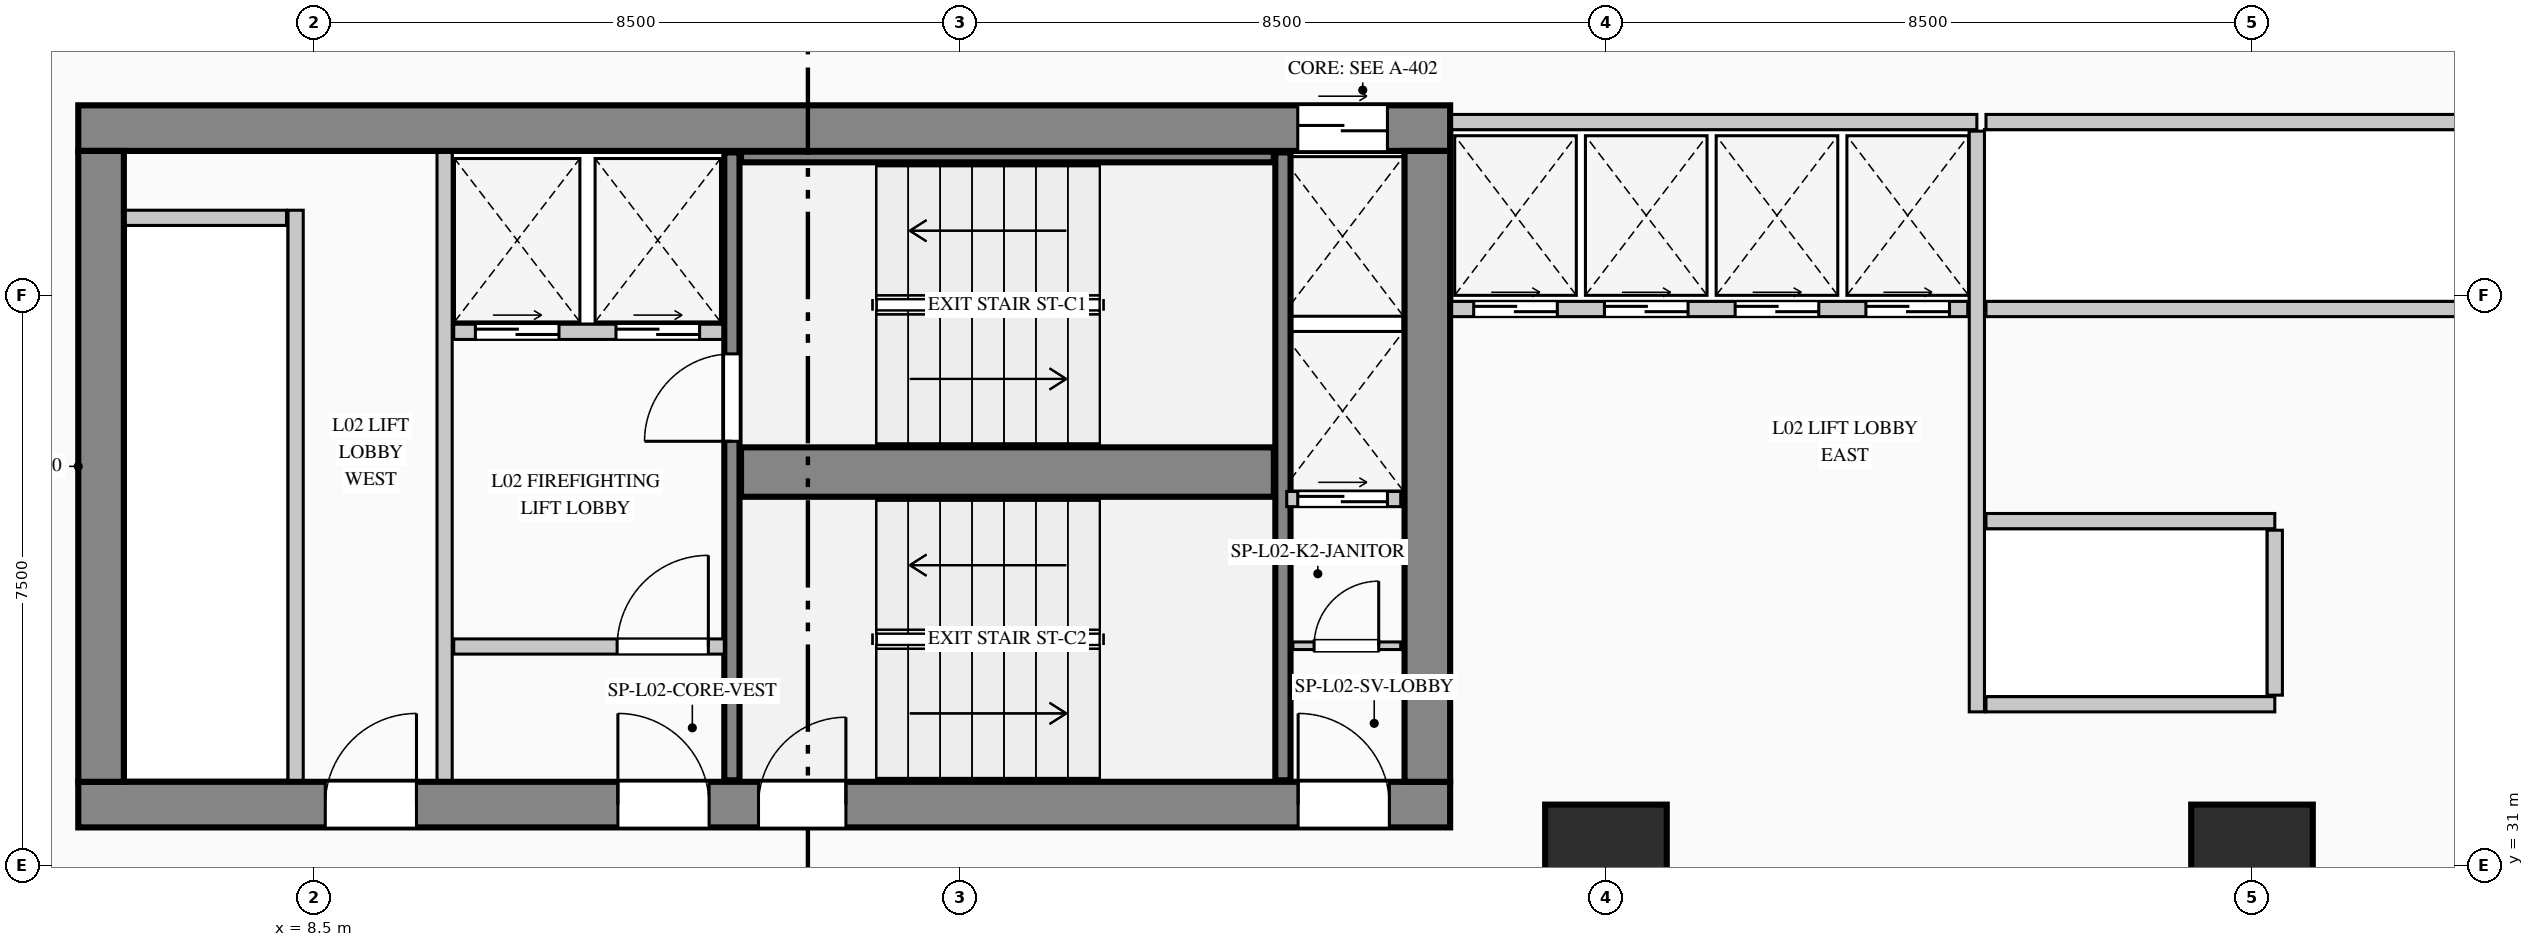
"""IFC4 building model, lengths in metres.
Left out: names, types, materials, properties, quantities, classifications, styles, units other than length and angle.
Written with IfcOpenShell. Run it as: python <this file> out.ifc"""

import sys

from ifc_helpers import new_model, si_unit, direction, frame, frame_2d, origin, origin_2d, place, context, subcontext, project, spatial, rectangle, extrude, element, fill, save


model = new_model("IFC4")
c1 = context("Model", 3, precision=1e-05, world=origin(), true_north=direction((0.0, 1.0)))
c2 = subcontext(c1, "Body", "Model", "MODEL_VIEW")
j1 = project(units=[si_unit("LENGTHUNIT", "METRE"), si_unit("PLANEANGLEUNIT", "RADIAN")], contexts=[c1])
p1 = place(None, origin())
s1 = spatial("IfcSite", under=j1, at=p1, CompositionType="ELEMENT")
p2 = place(p1, origin())
s2 = spatial("IfcBuilding", under=s1, at=p2, CompositionType="ELEMENT")
p3 = place(p2, frame((0.0, 0.0, 5.4)))
s3 = spatial("IfcBuildingStorey", under=s2, at=p3, CompositionType="ELEMENT", Elevation=5.4)
p4 = place(p3, frame((5.4, 40.7, 0.0), z_axis=(0.0, 0.0, 1.0), x_axis=(1.0, 0.0, 0.0)))
e1 = element("IfcWall", 1, at=p4, inside=s3, PredefinedType="SHEAR", context=c2, shape_type="SweptSolid", body=[
    extrude(rectangle(XDim=18.05, YDim=0.6, at=frame_2d((9.025, 0.0))), origin(), (0.0, 0.0, 1.0), 5.4),
])
p5 = place(p4, frame((16.045, 0.0, 0.0)))
e2 = element("IfcOpeningElement", 2, at=p5, cuts=e1, PredefinedType="OPENING", context=c2, shape_type="SweptSolid", body=[
    extrude(rectangle(XDim=1.18, YDim=2.25, at=frame_2d((0.59, 1.125))), frame((0.0, 0.31, 0.0), z_axis=(0.0, -1.0, 0.0), x_axis=(1.0, 0.0, 0.0)), (0.0, 0.0, 1.0), 0.62),
])
p6 = place(p3, frame((5.4, 31.8, 0.0), z_axis=(0.0, 0.0, 1.0), x_axis=(1.0, 0.0, 0.0)))
e3 = element("IfcWall", 3, at=p6, inside=s3, PredefinedType="SHEAR", context=c2, shape_type="SweptSolid", body=[
    extrude(rectangle(XDim=18.05, YDim=0.6, at=frame_2d((9.025, 0.0))), origin(), (0.0, 0.0, 1.0), 5.4),
])
p7 = place(p6, frame((3.25, 0.0, 0.0)))
e4 = element("IfcOpeningElement", 4, at=p7, cuts=e3, PredefinedType="OPENING", context=c2, shape_type="SweptSolid", body=[
    extrude(rectangle(XDim=1.2, YDim=2.2, at=frame_2d((0.6, 1.1))), frame((0.0, 0.31, 0.0), z_axis=(0.0, -1.0, 0.0), x_axis=(1.0, 0.0, 0.0)), (0.0, 0.0, 1.0), 0.62),
])
p8 = place(p6, frame((7.1, 0.0, 0.0)))
e5 = element("IfcOpeningElement", 5, at=p8, cuts=e3, PredefinedType="OPENING", context=c2, shape_type="SweptSolid", body=[
    extrude(rectangle(XDim=1.2, YDim=2.2, at=frame_2d((0.6, 1.1))), frame((0.0, 0.31, 0.0), z_axis=(0.0, -1.0, 0.0), x_axis=(1.0, 0.0, 0.0)), (0.0, 0.0, 1.0), 0.62),
])
p9 = place(p6, frame((8.95, 0.0, 0.0)))
e6 = element("IfcOpeningElement", 6, at=p9, cuts=e3, PredefinedType="OPENING", context=c2, shape_type="SweptSolid", body=[
    extrude(rectangle(XDim=1.15, YDim=2.2, at=frame_2d((0.575, 1.1))), frame((0.0, 0.31, 0.0), z_axis=(0.0, -1.0, 0.0), x_axis=(1.0, 0.0, 0.0)), (0.0, 0.0, 1.0), 0.62),
])
p10 = place(p6, frame((16.05, 0.0, 0.0)))
e7 = element("IfcOpeningElement", 7, at=p10, cuts=e3, PredefinedType="OPENING", context=c2, shape_type="SweptSolid", body=[
    extrude(rectangle(XDim=1.2, YDim=2.2, at=frame_2d((0.6, 1.1))), frame((0.0, 0.31, 0.0), z_axis=(0.0, -1.0, 0.0), x_axis=(1.0, 0.0, 0.0)), (0.0, 0.0, 1.0), 0.62),
])
for number, where, z_axis, x_axis in (
    (8, (5.7, 32.1, 0.0), (0.0, 0.0, 1.0), (0.0, 1.0, 0.0)),
    (9, (23.15, 32.1, 0.0), (0.0, 0.0, 1.0), (0.0, 1.0, 0.0)),
):
    element("IfcWall", number, at=place(p3, frame(where, z_axis=z_axis, x_axis=x_axis)), inside=s3, PredefinedType="SHEAR", context=c2, shape_type="SweptSolid", body=[
        extrude(rectangle(XDim=8.3, YDim=0.6, at=frame_2d((4.15, 0.0))), origin(), (0.0, 0.0, 1.0), 5.4),
    ])
p11 = place(p3, frame((14.0, 32.12, 0.0), z_axis=(0.0, 0.0, 1.0), x_axis=(0.0, 1.0, 0.0)))
e10 = element("IfcWall", 10, at=p11, inside=s3, PredefinedType="SHEAR", context=c2, shape_type="SweptSolid", body=[
    extrude(rectangle(XDim=8.26, YDim=0.2, at=frame_2d((4.13, 0.0))), origin(), (0.0, 0.0, 1.0), 5.4),
])
p12 = place(p11, frame((4.46, 0.0, 0.0)))
e11 = element("IfcOpeningElement", 11, at=p12, cuts=e10, PredefinedType="OPENING", context=c2, shape_type="SweptSolid", body=[
    extrude(rectangle(XDim=1.15, YDim=2.2, at=frame_2d((0.575, 1.1))), frame((0.0, 0.11, 0.0), z_axis=(0.0, -1.0, 0.0), x_axis=(1.0, 0.0, 0.0)), (0.0, 0.0, 1.0), 0.22),
])
p13 = place(p3, frame((14.12, 36.175, 0.0), z_axis=(0.0, 0.0, 1.0), x_axis=(1.0, 0.0, 0.0)))
e12 = element("IfcWall", 12, at=p13, inside=s3, PredefinedType="SHEAR", context=c2, shape_type="SweptSolid", body=[
    extrude(rectangle(XDim=7.01, YDim=0.65, at=frame_2d((3.505, 0.0))), origin(), (0.0, 0.0, 1.0), 5.4),
])
p14 = place(p3, frame((21.25, 32.12, 0.0), z_axis=(0.0, 0.0, 1.0), x_axis=(0.0, 1.0, 0.0)))
e13 = element("IfcWall", 13, at=p14, inside=s3, PredefinedType="SHEAR", context=c2, shape_type="SweptSolid", body=[
    extrude(rectangle(XDim=8.26, YDim=0.2, at=frame_2d((4.13, 0.0))), origin(), (0.0, 0.0, 1.0), 5.4),
])
p15 = place(p3, frame((14.12, 40.32, 0.0), z_axis=(0.0, 0.0, 1.0), x_axis=(1.0, 0.0, 0.0)))
e14 = element("IfcWall", 14, at=p15, inside=s3, PredefinedType="SHEAR", context=c2, shape_type="SweptSolid", body=[
    extrude(rectangle(XDim=7.01, YDim=0.14, at=frame_2d((3.505, 0.0))), origin(), (0.0, 0.0, 1.0), 5.4),
])
for number, where, z_axis, x_axis in (
    (15, (25.5, 31.0, 0.0), (0.0, 0.0, 1.0), (1.0, 0.0, 0.0)),
    (16, (34.0, 31.0, 0.0), (0.0, 0.0, 1.0), (1.0, 0.0, 0.0)),
):
    element("IfcColumn", number, at=place(p3, frame(where, z_axis=z_axis, x_axis=x_axis)), inside=s3, PredefinedType="COLUMN", context=c2, shape_type="SweptSolid", body=[
        extrude(rectangle(XDim=1.6, YDim=1.6, at=origin_2d()), origin(), (0.0, 0.0, 1.0), 5.4),
    ])
p16 = place(p3, frame((8.26, 32.12, 0.0), z_axis=(0.0, 0.0, 1.0), x_axis=(0.0, 1.0, 0.0)))
e17 = element("IfcWall", 17, at=p16, inside=s3, PredefinedType="PARTITIONING", context=c2, shape_type="SweptSolid", body=[
    extrude(rectangle(XDim=7.5, YDim=0.2, at=frame_2d((3.75, 0.0))), origin(), (0.0, 0.0, 1.0), 5.08),
])
p17 = place(p3, frame((6.02, 39.52, 0.0), z_axis=(0.0, 0.0, 1.0), x_axis=(1.0, 0.0, 0.0)))
e18 = element("IfcWall", 18, at=p17, inside=s3, PredefinedType="PARTITIONING", context=c2, shape_type="SweptSolid", body=[
    extrude(rectangle(XDim=2.12, YDim=0.2, at=frame_2d((1.06, 0.0))), origin(), (0.0, 0.0, 1.0), 5.08),
])
p18 = place(p3, frame((10.22, 32.12, 0.0), z_axis=(0.0, 0.0, 1.0), x_axis=(0.0, 1.0, 0.0)))
e19 = element("IfcWall", 19, at=p18, inside=s3, PredefinedType="PARTITIONING", context=c2, shape_type="SweptSolid", body=[
    extrude(rectangle(XDim=8.26, YDim=0.2, at=frame_2d((4.13, 0.0))), origin(), (0.0, 0.0, 1.0), 5.08),
])
p19 = place(p3, frame((10.34, 38.02, 0.0), z_axis=(0.0, 0.0, 1.0), x_axis=(1.0, 0.0, 0.0)))
e20 = element("IfcWall", 20, at=p19, inside=s3, PredefinedType="PARTITIONING", context=c2, shape_type="SweptSolid", body=[
    extrude(rectangle(XDim=3.54, YDim=0.2, at=frame_2d((1.77, 0.0))), origin(), (0.0, 0.0, 1.0), 5.08),
])
p20 = place(p19, frame((0.285, 0.0, 0.0)))
e21 = element("IfcOpeningElement", 21, at=p20, cuts=e20, PredefinedType="OPENING", context=c2, shape_type="SweptSolid", body=[
    extrude(rectangle(XDim=1.1, YDim=2.2, at=frame_2d((0.55, 1.1))), frame((0.0, 0.11, 0.0), z_axis=(0.0, -1.0, 0.0), x_axis=(1.0, 0.0, 0.0)), (0.0, 0.0, 1.0), 0.22),
])
p21 = place(p19, frame((2.135, 0.0, 0.0)))
e22 = element("IfcOpeningElement", 22, at=p21, cuts=e20, PredefinedType="OPENING", context=c2, shape_type="SweptSolid", body=[
    extrude(rectangle(XDim=1.1, YDim=2.2, at=frame_2d((0.55, 1.1))), frame((0.0, 0.11, 0.0), z_axis=(0.0, -1.0, 0.0), x_axis=(1.0, 0.0, 0.0)), (0.0, 0.0, 1.0), 0.22),
])
p22 = place(p3, frame((10.34, 33.88, 0.0), z_axis=(0.0, 0.0, 1.0), x_axis=(1.0, 0.0, 0.0)))
e23 = element("IfcWall", 23, at=p22, inside=s3, PredefinedType="PARTITIONING", context=c2, shape_type="SweptSolid", body=[
    extrude(rectangle(XDim=3.56, YDim=0.2, at=frame_2d((1.78, 0.0))), origin(), (0.0, 0.0, 1.0), 5.08),
])
p23 = place(p22, frame((2.15, 0.0, 0.0)))
e24 = element("IfcOpeningElement", 24, at=p23, cuts=e23, PredefinedType="OPENING", context=c2, shape_type="SweptSolid", body=[
    extrude(rectangle(XDim=1.2, YDim=2.2, at=frame_2d((0.6, 1.1))), frame((0.0, 0.11, 0.0), z_axis=(0.0, -1.0, 0.0), x_axis=(1.0, 0.0, 0.0)), (0.0, 0.0, 1.0), 0.22),
])
p24 = place(p3, frame((21.38, 33.89, 0.0), z_axis=(0.0, 0.0, 1.0), x_axis=(1.0, 0.0, 0.0)))
e25 = element("IfcWall", 25, at=p24, inside=s3, PredefinedType="PARTITIONING", context=c2, shape_type="SweptSolid", body=[
    extrude(rectangle(XDim=1.42, YDim=0.1, at=frame_2d((0.71, 0.0))), origin(), (0.0, 0.0, 1.0), 5.08),
])
p25 = place(p24, frame((0.28, 0.0, 0.0)))
e26 = element("IfcOpeningElement", 26, at=p25, cuts=e25, PredefinedType="OPENING", context=c2, shape_type="SweptSolid", body=[
    extrude(rectangle(XDim=0.85, YDim=2.1, at=frame_2d((0.425, 1.05))), frame((0.0, 0.06, 0.0), z_axis=(0.0, -1.0, 0.0), x_axis=(1.0, 0.0, 0.0)), (0.0, 0.0, 1.0), 0.12),
])
p26 = place(p3, frame((21.3, 35.82, 0.0), z_axis=(0.0, 0.0, 1.0), x_axis=(1.0, 0.0, 0.0)))
e27 = element("IfcWall", 27, at=p26, inside=s3, PredefinedType="PARTITIONING", context=c2, shape_type="SweptSolid", body=[
    extrude(rectangle(XDim=1.5, YDim=0.2, at=frame_2d((0.75, 0.0))), origin(), (0.0, 0.0, 1.0), 5.08),
])
p27 = place(p26, frame((0.145, 0.0, 0.0)))
e28 = element("IfcOpeningElement", 28, at=p27, cuts=e27, PredefinedType="OPENING", context=c2, shape_type="SweptSolid", body=[
    extrude(rectangle(XDim=1.18, YDim=2.25, at=frame_2d((0.59, 1.125))), frame((0.0, 0.11, 0.0), z_axis=(0.0, -1.0, 0.0), x_axis=(1.0, 0.0, 0.0)), (0.0, 0.0, 1.0), 0.22),
])
p28 = place(p3, frame((23.47, 40.78, 0.0), z_axis=(0.0, 0.0, 1.0), x_axis=(1.0, 0.0, 0.0)))
e29 = element("IfcWall", 29, at=p28, inside=s3, PredefinedType="PARTITIONING", context=c2, shape_type="SweptSolid", body=[
    extrude(rectangle(XDim=6.91, YDim=0.2, at=frame_2d((3.455, 0.0))), origin(), (0.0, 0.0, 1.0), 5.08),
])
p29 = place(p3, frame((30.38, 33.02, 0.0), z_axis=(0.0, 0.0, 1.0), x_axis=(0.0, 1.0, 0.0)))
e30 = element("IfcWall", 30, at=p29, inside=s3, PredefinedType="PARTITIONING", context=c2, shape_type="SweptSolid", body=[
    extrude(rectangle(XDim=7.64, YDim=0.2, at=frame_2d((3.82, 0.0))), origin(), (0.0, 0.0, 1.0), 5.08),
])
p30 = place(p3, frame((23.47, 38.32, 0.0), z_axis=(0.0, 0.0, 1.0), x_axis=(1.0, 0.0, 0.0)))
e31 = element("IfcWall", 31, at=p30, inside=s3, PredefinedType="PARTITIONING", context=c2, shape_type="SweptSolid", body=[
    extrude(rectangle(XDim=6.79, YDim=0.2, at=frame_2d((3.395, 0.0))), origin(), (0.0, 0.0, 1.0), 5.08),
])
p31 = place(p30, frame((0.29, 0.0, 0.0)))
e32 = element("IfcOpeningElement", 32, at=p31, cuts=e31, PredefinedType="OPENING", context=c2, shape_type="SweptSolid", body=[
    extrude(rectangle(XDim=1.1, YDim=2.2, at=frame_2d((0.55, 1.1))), frame((0.0, 0.11, 0.0), z_axis=(0.0, -1.0, 0.0), x_axis=(1.0, 0.0, 0.0)), (0.0, 0.0, 1.0), 0.22),
])
p32 = place(p30, frame((2.01, 0.0, 0.0)))
e33 = element("IfcOpeningElement", 33, at=p32, cuts=e31, PredefinedType="OPENING", context=c2, shape_type="SweptSolid", body=[
    extrude(rectangle(XDim=1.1, YDim=2.2, at=frame_2d((0.55, 1.1))), frame((0.0, 0.11, 0.0), z_axis=(0.0, -1.0, 0.0), x_axis=(1.0, 0.0, 0.0)), (0.0, 0.0, 1.0), 0.22),
])
p33 = place(p30, frame((3.73, 0.0, 0.0)))
e34 = element("IfcOpeningElement", 34, at=p33, cuts=e31, PredefinedType="OPENING", context=c2, shape_type="SweptSolid", body=[
    extrude(rectangle(XDim=1.1, YDim=2.2, at=frame_2d((0.55, 1.1))), frame((0.0, 0.11, 0.0), z_axis=(0.0, -1.0, 0.0), x_axis=(1.0, 0.0, 0.0)), (0.0, 0.0, 1.0), 0.22),
])
p34 = place(p30, frame((5.45, 0.0, 0.0)))
e35 = element("IfcOpeningElement", 35, at=p34, cuts=e31, PredefinedType="OPENING", context=c2, shape_type="SweptSolid", body=[
    extrude(rectangle(XDim=1.1, YDim=2.2, at=frame_2d((0.55, 1.1))), frame((0.0, 0.11, 0.0), z_axis=(0.0, -1.0, 0.0), x_axis=(1.0, 0.0, 0.0)), (0.0, 0.0, 1.0), 0.22),
])
p35 = place(p3, frame((30.5, 40.78, 0.0), z_axis=(0.0, 0.0, 1.0), x_axis=(1.0, 0.0, 0.0)))
e36 = element("IfcWall", 36, at=p35, inside=s3, PredefinedType="PARTITIONING", context=c2, shape_type="SweptSolid", body=[
    extrude(rectangle(XDim=6.98, YDim=0.2, at=frame_2d((3.49, 0.0))), origin(), (0.0, 0.0, 1.0), 5.08),
])
p36 = place(p3, frame((30.5, 38.32, 0.0), z_axis=(0.0, 0.0, 1.0), x_axis=(1.0, 0.0, 0.0)))
e37 = element("IfcWall", 37, at=p36, inside=s3, PredefinedType="PARTITIONING", context=c2, shape_type="SweptSolid", body=[
    extrude(rectangle(XDim=6.86, YDim=0.2, at=frame_2d((3.43, 0.0))), origin(), (0.0, 0.0, 1.0), 5.08),
])
for number, where, z_axis, x_axis in (
    (38, (30.5, 35.53, 0.0), (0.0, 0.0, 1.0), (1.0, 0.0, 0.0)),
    (39, (30.5, 33.12, 0.0), (0.0, 0.0, 1.0), (1.0, 0.0, 0.0)),
):
    element("IfcWall", number, at=place(p3, frame(where, z_axis=z_axis, x_axis=x_axis)), inside=s3, PredefinedType="PARTITIONING", context=c2, shape_type="SweptSolid", body=[
        extrude(rectangle(XDim=3.8, YDim=0.2, at=frame_2d((1.9, 0.0))), origin(), (0.0, 0.0, 1.0), 5.08),
    ])
p37 = place(p3, frame((34.3, 33.24, 0.0), z_axis=(0.0, 0.0, 1.0), x_axis=(0.0, 1.0, 0.0)))
e40 = element("IfcWall", 40, at=p37, inside=s3, PredefinedType="PARTITIONING", context=c2, shape_type="SweptSolid", body=[
    extrude(rectangle(XDim=2.17, YDim=0.2, at=frame_2d((1.085, 0.0))), origin(), (0.0, 0.0, 1.0), 5.08),
])
p38 = place(p7, origin())
e41 = element("IfcDoor", 41, at=p38, inside=s3, OperationType="SINGLE_SWING_RIGHT", PredefinedType="DOOR", context=c2, shape_type="SweptSolid", body=[
    extrude(rectangle(XDim=1.2, YDim=2.2, at=frame_2d((0.6, 1.1))), frame((0.0, 0.025, 0.0), z_axis=(0.0, -1.0, 0.0), x_axis=(1.0, 0.0, 0.0)), (0.0, 0.0, 1.0), 0.05),
])
fill(e4, e41)
p39 = place(p8, origin())
e42 = element("IfcDoor", 42, at=p39, inside=s3, OperationType="SINGLE_SWING_LEFT", PredefinedType="DOOR", context=c2, shape_type="SweptSolid", body=[
    extrude(rectangle(XDim=1.2, YDim=2.2, at=frame_2d((0.6, 1.1))), frame((0.0, 0.025, 0.0), z_axis=(0.0, -1.0, 0.0), x_axis=(1.0, 0.0, 0.0)), (0.0, 0.0, 1.0), 0.05),
])
fill(e5, e42)
p40 = place(p9, origin())
e43 = element("IfcDoor", 43, at=p40, inside=s3, OperationType="SINGLE_SWING_RIGHT", PredefinedType="DOOR", context=c2, shape_type="SweptSolid", body=[
    extrude(rectangle(XDim=1.15, YDim=2.2, at=frame_2d((0.575, 1.1))), frame((0.0, 0.025, 0.0), z_axis=(0.0, -1.0, 0.0), x_axis=(1.0, 0.0, 0.0)), (0.0, 0.0, 1.0), 0.05),
])
fill(e6, e43)
p41 = place(p10, origin())
e44 = element("IfcDoor", 44, at=p41, inside=s3, OperationType="SINGLE_SWING_LEFT", PredefinedType="DOOR", context=c2, shape_type="SweptSolid", body=[
    extrude(rectangle(XDim=1.2, YDim=2.2, at=frame_2d((0.6, 1.1))), frame((0.0, 0.025, 0.0), z_axis=(0.0, -1.0, 0.0), x_axis=(1.0, 0.0, 0.0)), (0.0, 0.0, 1.0), 0.05),
])
fill(e7, e44)
p42 = place(p23, origin())
e45 = element("IfcDoor", 45, at=p42, inside=s3, OperationType="SINGLE_SWING_RIGHT", PredefinedType="DOOR", context=c2, shape_type="SweptSolid", body=[
    extrude(rectangle(XDim=1.2, YDim=2.2, at=frame_2d((0.6, 1.1))), frame((0.0, 0.025, 0.0), z_axis=(0.0, -1.0, 0.0), x_axis=(1.0, 0.0, 0.0)), (0.0, 0.0, 1.0), 0.05),
])
fill(e24, e45)
p43 = place(p25, origin())
e46 = element("IfcDoor", 46, at=p43, inside=s3, OperationType="SINGLE_SWING_RIGHT", PredefinedType="DOOR", context=c2, shape_type="SweptSolid", body=[
    extrude(rectangle(XDim=0.85, YDim=2.1, at=frame_2d((0.425, 1.05))), frame((0.0, 0.025, 0.0), z_axis=(0.0, -1.0, 0.0), x_axis=(1.0, 0.0, 0.0)), (0.0, 0.0, 1.0), 0.05),
])
fill(e26, e46)
p44 = place(p12, origin())
e47 = element("IfcDoor", 47, at=p44, inside=s3, OperationType="SINGLE_SWING_LEFT", PredefinedType="DOOR", context=c2, shape_type="SweptSolid", body=[
    extrude(rectangle(XDim=1.15, YDim=2.2, at=frame_2d((0.575, 1.1))), frame((0.0, 0.025, 0.0), z_axis=(0.0, -1.0, 0.0), x_axis=(1.0, 0.0, 0.0)), (0.0, 0.0, 1.0), 0.05),
])
fill(e11, e47)
p45 = place(p20, origin())
e48 = element("IfcDoor", 48, at=p45, inside=s3, OperationType="DOUBLE_DOOR_SLIDING", PredefinedType="DOOR", context=c2, shape_type="SweptSolid", body=[
    extrude(rectangle(XDim=1.1, YDim=2.2, at=frame_2d((0.55, 1.1))), frame((0.0, 0.025, 0.0), z_axis=(0.0, -1.0, 0.0), x_axis=(1.0, 0.0, 0.0)), (0.0, 0.0, 1.0), 0.05),
])
fill(e21, e48)
p46 = place(p21, origin())
e49 = element("IfcDoor", 49, at=p46, inside=s3, OperationType="DOUBLE_DOOR_SLIDING", PredefinedType="DOOR", context=c2, shape_type="SweptSolid", body=[
    extrude(rectangle(XDim=1.1, YDim=2.2, at=frame_2d((0.55, 1.1))), frame((0.0, 0.025, 0.0), z_axis=(0.0, -1.0, 0.0), x_axis=(1.0, 0.0, 0.0)), (0.0, 0.0, 1.0), 0.05),
])
fill(e22, e49)
p47 = place(p5, origin())
e50 = element("IfcDoor", 50, at=p47, inside=s3, OperationType="DOUBLE_DOOR_SLIDING", PredefinedType="DOOR", context=c2, shape_type="SweptSolid", body=[
    extrude(rectangle(XDim=1.18, YDim=2.25, at=frame_2d((0.59, 1.125))), frame((0.0, 0.025, 0.0), z_axis=(0.0, -1.0, 0.0), x_axis=(1.0, 0.0, 0.0)), (0.0, 0.0, 1.0), 0.05),
])
fill(e2, e50)
p48 = place(p27, origin())
e51 = element("IfcDoor", 51, at=p48, inside=s3, OperationType="DOUBLE_DOOR_SLIDING", PredefinedType="DOOR", context=c2, shape_type="SweptSolid", body=[
    extrude(rectangle(XDim=1.18, YDim=2.25, at=frame_2d((0.59, 1.125))), frame((0.0, 0.025, 0.0), z_axis=(0.0, -1.0, 0.0), x_axis=(1.0, 0.0, 0.0)), (0.0, 0.0, 1.0), 0.05),
])
fill(e28, e51)
p49 = place(p31, origin())
e52 = element("IfcDoor", 52, at=p49, inside=s3, OperationType="DOUBLE_DOOR_SLIDING", PredefinedType="DOOR", context=c2, shape_type="SweptSolid", body=[
    extrude(rectangle(XDim=1.1, YDim=2.2, at=frame_2d((0.55, 1.1))), frame((0.0, 0.025, 0.0), z_axis=(0.0, -1.0, 0.0), x_axis=(1.0, 0.0, 0.0)), (0.0, 0.0, 1.0), 0.05),
])
fill(e32, e52)
p50 = place(p32, origin())
e53 = element("IfcDoor", 53, at=p50, inside=s3, OperationType="DOUBLE_DOOR_SLIDING", PredefinedType="DOOR", context=c2, shape_type="SweptSolid", body=[
    extrude(rectangle(XDim=1.1, YDim=2.2, at=frame_2d((0.55, 1.1))), frame((0.0, 0.025, 0.0), z_axis=(0.0, -1.0, 0.0), x_axis=(1.0, 0.0, 0.0)), (0.0, 0.0, 1.0), 0.05),
])
fill(e33, e53)
p51 = place(p33, origin())
e54 = element("IfcDoor", 54, at=p51, inside=s3, OperationType="DOUBLE_DOOR_SLIDING", PredefinedType="DOOR", context=c2, shape_type="SweptSolid", body=[
    extrude(rectangle(XDim=1.1, YDim=2.2, at=frame_2d((0.55, 1.1))), frame((0.0, 0.025, 0.0), z_axis=(0.0, -1.0, 0.0), x_axis=(1.0, 0.0, 0.0)), (0.0, 0.0, 1.0), 0.05),
])
fill(e34, e54)
p52 = place(p34, origin())
e55 = element("IfcDoor", 55, at=p52, inside=s3, OperationType="DOUBLE_DOOR_SLIDING", PredefinedType="DOOR", context=c2, shape_type="SweptSolid", body=[
    extrude(rectangle(XDim=1.1, YDim=2.2, at=frame_2d((0.55, 1.1))), frame((0.0, 0.025, 0.0), z_axis=(0.0, -1.0, 0.0), x_axis=(1.0, 0.0, 0.0)), (0.0, 0.0, 1.0), 0.05),
])
fill(e35, e55)
save(model, sys.argv[1])
